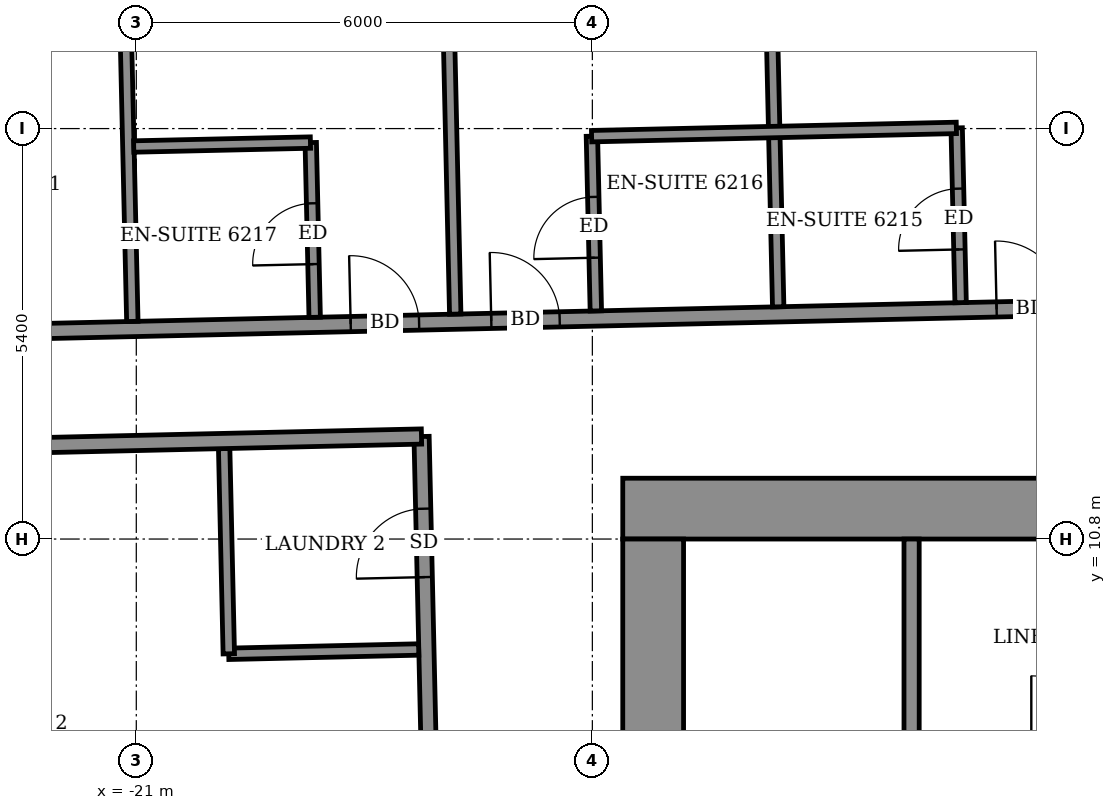
"""IFC4 building model, lengths in metres.
Left out: names, types, materials, properties, quantities, classifications, styles, units other than length and angle.
Written with IfcOpenShell. Run it as: python <this file> out.ifc"""

import sys

from ifc_helpers import new_model, si_unit, direction, frame, frame_2d, origin, place, context, subcontext, project, spatial, rectangle, extrude, element, fill, save


model = new_model("IFC4")
c1 = context("Model", 3, precision=1e-05, world=origin(), true_north=direction((0.0, 1.0)))
c2 = subcontext(c1, "Body", "Model", "MODEL_VIEW")
j1 = project(units=[si_unit("LENGTHUNIT", "METRE"), si_unit("PLANEANGLEUNIT", "RADIAN")], contexts=[c1])
p1 = place(None, origin())
s1 = spatial("IfcSite", under=j1, at=p1, CompositionType="ELEMENT")
p2 = place(p1, origin())
s2 = spatial("IfcBuilding", under=s1, at=p2, CompositionType="ELEMENT")
p3 = place(p2, frame((0.0, 0.0, 245.5)))
s3 = spatial("IfcBuildingStorey", under=s2, at=p3, CompositionType="ELEMENT", Elevation=245.5)
p4 = place(p3, frame((-16.678, -12.919, 0.0), z_axis=(0.0, 0.0, 1.0), x_axis=(-0.022696191528, 0.999742408268, 0.0)))
e1 = element("IfcWall", 1, at=p4, inside=s3, PredefinedType="PARTITIONING", context=c2, shape_type="SweptSolid", body=[
    extrude(rectangle(XDim=25.074, YDim=0.2, at=frame_2d((12.537, 0.0))), origin(), (0.0, 0.0, 1.0), 3.05),
])
p5 = place(p4, frame((19.537, 0.0, 0.0)))
e2 = element("IfcOpeningElement", 2, at=p5, cuts=e1, PredefinedType="OPENING", context=c2, shape_type="SweptSolid", body=[
    extrude(rectangle(XDim=1.0, YDim=2.1, at=frame_2d((0.5, 1.05))), frame((0.0, 0.11, 0.0), z_axis=(0.0, -1.0, 0.0), x_axis=(1.0, 0.0, 0.0)), (0.0, 0.0, 1.0), 0.22),
])
p6 = place(p4, frame((23.224, 0.0, 0.0)))
e3 = element("IfcOpeningElement", 3, at=p6, cuts=e1, PredefinedType="OPENING", context=c2, shape_type="SweptSolid", body=[
    extrude(rectangle(XDim=0.9, YDim=2.1, at=frame_2d((0.45, 1.05))), frame((0.0, 0.11, 0.0), z_axis=(0.0, -1.0, 0.0), x_axis=(1.0, 0.0, 0.0)), (0.0, 0.0, 1.0), 0.22),
])
p7 = place(p4, frame((13.849, 0.0, 0.0)))
e4 = element("IfcOpeningElement", 4, at=p7, cuts=e1, PredefinedType="OPENING", context=c2, shape_type="SweptSolid", body=[
    extrude(rectangle(XDim=1.0, YDim=2.1, at=frame_2d((0.5, 1.05))), frame((0.0, 0.11, 0.0), z_axis=(0.0, -1.0, 0.0), x_axis=(1.0, 0.0, 0.0)), (0.0, 0.0, 1.0), 0.22),
])
p8 = place(p4, frame((16.149, 0.0, 0.0)))
e5 = element("IfcOpeningElement", 5, at=p8, cuts=e1, PredefinedType="OPENING", context=c2, shape_type="SweptSolid", body=[
    extrude(rectangle(XDim=0.9, YDim=2.1, at=frame_2d((0.45, 1.05))), frame((0.0, 0.11, 0.0), z_axis=(0.0, -1.0, 0.0), x_axis=(1.0, 0.0, 0.0)), (0.0, 0.0, 1.0), 0.22),
])
p9 = place(p4, frame((11.849, 0.0, 0.0)))
e6 = element("IfcOpeningElement", 6, at=p9, cuts=e1, PredefinedType="OPENING", context=c2, shape_type="SweptSolid", body=[
    extrude(rectangle(XDim=1.0, YDim=2.1, at=frame_2d((0.5, 1.05))), frame((0.0, 0.11, 0.0), z_axis=(0.0, -1.0, 0.0), x_axis=(1.0, 0.0, 0.0)), (0.0, 0.0, 1.0), 0.22),
])
p10 = place(p4, frame((9.649, 0.0, 0.0)))
e7 = element("IfcOpeningElement", 7, at=p10, cuts=e1, PredefinedType="OPENING", context=c2, shape_type="SweptSolid", body=[
    extrude(rectangle(XDim=0.9, YDim=2.1, at=frame_2d((0.45, 1.05))), frame((0.0, 0.11, 0.0), z_axis=(0.0, -1.0, 0.0), x_axis=(1.0, 0.0, 0.0)), (0.0, 0.0, 1.0), 0.22),
])
p11 = place(p4, frame((7.324, 0.0, 0.0)))
e8 = element("IfcOpeningElement", 8, at=p11, cuts=e1, PredefinedType="OPENING", context=c2, shape_type="SweptSolid", body=[
    extrude(rectangle(XDim=1.0, YDim=2.1, at=frame_2d((0.5, 1.05))), frame((0.0, 0.11, 0.0), z_axis=(0.0, -1.0, 0.0), x_axis=(1.0, 0.0, 0.0)), (0.0, 0.0, 1.0), 0.22),
])
p12 = place(p4, frame((4.999, 0.0, 0.0)))
e9 = element("IfcOpeningElement", 9, at=p12, cuts=e1, PredefinedType="OPENING", context=c2, shape_type="SweptSolid", body=[
    extrude(rectangle(XDim=0.9, YDim=2.1, at=frame_2d((0.45, 1.05))), frame((0.0, 0.11, 0.0), z_axis=(0.0, -1.0, 0.0), x_axis=(1.0, 0.0, 0.0)), (0.0, 0.0, 1.0), 0.22),
])
p13 = place(p3, frame((-19.784, 9.29, 0.0), z_axis=(0.0, 0.0, 1.0), x_axis=(0.999741028149, 0.022756903044, 0.0)))
e10 = element("IfcWall", 10, at=p13, inside=s3, PredefinedType="PARTITIONING", context=c2, shape_type="SweptSolid", body=[
    extrude(rectangle(XDim=2.5, YDim=0.15, at=frame_2d((1.25, 0.0))), origin(), (0.0, 0.0, 1.0), 3.05),
])
p14 = place(p3, frame((-19.783, 9.29, 0.0), z_axis=(0.0, 0.0, 1.0), x_axis=(-0.022600248254, 0.99974458177, 0.0)))
e11 = element("IfcWall", 11, at=p14, inside=s3, PredefinedType="PARTITIONING", context=c2, shape_type="SweptSolid", body=[
    extrude(rectangle(XDim=2.701, YDim=0.15, at=frame_2d((1.35, 0.0))), origin(), (0.0, 0.0, 1.0), 3.05),
])
p15 = place(p3, frame((-27.618, 11.913, 0.0), z_axis=(0.0, 0.0, 1.0), x_axis=(0.999741483035, 0.022736910479, 0.0)))
e12 = element("IfcWall", 12, at=p15, inside=s3, PredefinedType="PARTITIONING", context=c2, shape_type="SweptSolid", body=[
    extrude(rectangle(XDim=10.373, YDim=0.2, at=frame_2d((5.186, 0.0))), origin(), (0.0, 0.0, 1.0), 3.05),
])
p16 = place(p3, frame((-27.652, 13.413, 0.0), z_axis=(0.0, 0.0, 1.0), x_axis=(0.999742864992, 0.022676064408, 0.0)))
e13 = element("IfcWall", 13, at=p16, inside=s3, PredefinedType="PARTITIONING", context=c2, shape_type="SweptSolid", body=[
    extrude(rectangle(XDim=50.882, YDim=0.2, at=frame_2d((25.441, 0.0))), origin(), (0.0, 0.0, 1.0), 3.05),
])
p17 = place(p16, frame((47.801, 0.0, 0.0)))
e14 = element("IfcOpeningElement", 14, at=p17, cuts=e13, PredefinedType="OPENING", context=c2, shape_type="SweptSolid", body=[
    extrude(rectangle(XDim=1.0, YDim=2.1, at=frame_2d((0.5, 1.05))), frame((0.0, 0.11, 0.0), z_axis=(0.0, -1.0, 0.0), x_axis=(1.0, 0.0, 0.0)), (0.0, 0.0, 1.0), 0.22),
])
p18 = place(p16, frame((43.425, 0.0, 0.0)))
e15 = element("IfcOpeningElement", 15, at=p18, cuts=e13, PredefinedType="OPENING", context=c2, shape_type="SweptSolid", body=[
    extrude(rectangle(XDim=0.9, YDim=2.1, at=frame_2d((0.45, 1.05))), frame((0.0, 0.11, 0.0), z_axis=(0.0, -1.0, 0.0), x_axis=(1.0, 0.0, 0.0)), (0.0, 0.0, 1.0), 0.22),
])
p19 = place(p16, frame((36.8, 0.0, 0.0)))
e16 = element("IfcOpeningElement", 16, at=p19, cuts=e13, PredefinedType="OPENING", context=c2, shape_type="SweptSolid", body=[
    extrude(rectangle(XDim=0.9, YDim=2.1, at=frame_2d((0.45, 1.05))), frame((0.0, 0.11, 0.0), z_axis=(0.0, -1.0, 0.0), x_axis=(1.0, 0.0, 0.0)), (0.0, 0.0, 1.0), 0.22),
])
p20 = place(p16, frame((34.975, 0.0, 0.0)))
e17 = element("IfcOpeningElement", 17, at=p20, cuts=e13, PredefinedType="OPENING", context=c2, shape_type="SweptSolid", body=[
    extrude(rectangle(XDim=0.9, YDim=2.1, at=frame_2d((0.45, 1.05))), frame((0.0, 0.11, 0.0), z_axis=(0.0, -1.0, 0.0), x_axis=(1.0, 0.0, 0.0)), (0.0, 0.0, 1.0), 0.22),
])
p21 = place(p16, frame((28.325, 0.0, 0.0)))
e18 = element("IfcOpeningElement", 18, at=p21, cuts=e13, PredefinedType="OPENING", context=c2, shape_type="SweptSolid", body=[
    extrude(rectangle(XDim=0.9, YDim=2.1, at=frame_2d((0.45, 1.05))), frame((0.0, 0.11, 0.0), z_axis=(0.0, -1.0, 0.0), x_axis=(1.0, 0.0, 0.0)), (0.0, 0.0, 1.0), 0.22),
])
p22 = place(p16, frame((26.475, 0.0, 0.0)))
e19 = element("IfcOpeningElement", 19, at=p22, cuts=e13, PredefinedType="OPENING", context=c2, shape_type="SweptSolid", body=[
    extrude(rectangle(XDim=0.9, YDim=2.1, at=frame_2d((0.45, 1.05))), frame((0.0, 0.11, 0.0), z_axis=(0.0, -1.0, 0.0), x_axis=(1.0, 0.0, 0.0)), (0.0, 0.0, 1.0), 0.22),
])
p23 = place(p16, frame((19.825, 0.0, 0.0)))
e20 = element("IfcOpeningElement", 20, at=p23, cuts=e13, PredefinedType="OPENING", context=c2, shape_type="SweptSolid", body=[
    extrude(rectangle(XDim=0.9, YDim=2.1, at=frame_2d((0.45, 1.05))), frame((0.0, 0.11, 0.0), z_axis=(0.0, -1.0, 0.0), x_axis=(1.0, 0.0, 0.0)), (0.0, 0.0, 1.0), 0.22),
])
p24 = place(p16, frame((17.975, 0.0, 0.0)))
e21 = element("IfcOpeningElement", 21, at=p24, cuts=e13, PredefinedType="OPENING", context=c2, shape_type="SweptSolid", body=[
    extrude(rectangle(XDim=0.9, YDim=2.1, at=frame_2d((0.45, 1.05))), frame((0.0, 0.11, 0.0), z_axis=(0.0, -1.0, 0.0), x_axis=(1.0, 0.0, 0.0)), (0.0, 0.0, 1.0), 0.22),
])
p25 = place(p16, frame((11.325, 0.0, 0.0)))
e22 = element("IfcOpeningElement", 22, at=p25, cuts=e13, PredefinedType="OPENING", context=c2, shape_type="SweptSolid", body=[
    extrude(rectangle(XDim=0.9, YDim=2.1, at=frame_2d((0.45, 1.05))), frame((0.0, 0.11, 0.0), z_axis=(0.0, -1.0, 0.0), x_axis=(1.0, 0.0, 0.0)), (0.0, 0.0, 1.0), 0.22),
])
p26 = place(p16, frame((9.475, 0.0, 0.0)))
e23 = element("IfcOpeningElement", 23, at=p26, cuts=e13, PredefinedType="OPENING", context=c2, shape_type="SweptSolid", body=[
    extrude(rectangle(XDim=0.9, YDim=2.1, at=frame_2d((0.45, 1.05))), frame((0.0, 0.11, 0.0), z_axis=(0.0, -1.0, 0.0), x_axis=(1.0, 0.0, 0.0)), (0.0, 0.0, 1.0), 0.22),
])
p27 = place(p16, frame((2.772, 0.0, 0.0)))
e24 = element("IfcOpeningElement", 24, at=p27, cuts=e13, PredefinedType="OPENING", context=c2, shape_type="SweptSolid", body=[
    extrude(rectangle(XDim=1.0, YDim=2.1, at=frame_2d((0.5, 1.05))), frame((0.0, 0.11, 0.0), z_axis=(0.0, -1.0, 0.0), x_axis=(1.0, 0.0, 0.0)), (0.0, 0.0, 1.0), 0.22),
])
p28 = place(p3, frame((-21.052, 13.663, 0.0), z_axis=(0.0, 0.0, 1.0), x_axis=(-0.022706435224, 0.999742175663, 0.0)))
e25 = element("IfcWall", 25, at=p28, inside=s3, PredefinedType="PARTITIONING", context=c2, shape_type="SweptSolid", body=[
    extrude(rectangle(XDim=8.15, YDim=0.15, at=frame_2d((4.075, 0.0))), origin(), (0.0, 0.0, 1.0), 2.5),
])
p29 = place(p3, frame((-18.653, 13.717, 0.0), z_axis=(0.0, 0.0, 1.0), x_axis=(-0.022612884682, 0.999744296031, 0.0)))
e26 = element("IfcWall", 26, at=p29, inside=s3, PredefinedType="PARTITIONING", context=c2, shape_type="SweptSolid", body=[
    extrude(rectangle(XDim=2.3, YDim=0.15, at=frame_2d((1.15, 0.0))), origin(), (0.0, 0.0, 1.0), 3.05),
])
p30 = place(p29, frame((0.7, 0.0, 0.0)))
e27 = element("IfcOpeningElement", 27, at=p30, cuts=e26, PredefinedType="OPENING", context=c2, shape_type="SweptSolid", body=[
    extrude(rectangle(XDim=0.8, YDim=2.1, at=frame_2d((0.4, 1.05))), frame((0.0, 0.085, 0.0), z_axis=(0.0, -1.0, 0.0), x_axis=(1.0, 0.0, 0.0)), (0.0, 0.0, 1.0), 0.17),
])
p31 = place(p3, frame((-16.804, 13.759, 0.0), z_axis=(0.0, 0.0, 1.0), x_axis=(-0.022586673637, 0.999744888546, 0.0)))
e28 = element("IfcWall", 28, at=p31, inside=s3, PredefinedType="PARTITIONING", context=c2, shape_type="SweptSolid", body=[
    extrude(rectangle(XDim=8.15, YDim=0.15, at=frame_2d((4.075, 0.0))), origin(), (0.0, 0.0, 1.0), 3.05),
])
p32 = place(p3, frame((-14.954, 13.801, 0.0), z_axis=(0.0, 0.0, 1.0), x_axis=(-0.022612884682, 0.999744296031, 0.0)))
e29 = element("IfcWall", 29, at=p32, inside=s3, PredefinedType="PARTITIONING", context=c2, shape_type="SweptSolid", body=[
    extrude(rectangle(XDim=2.3, YDim=0.15, at=frame_2d((1.15, 0.0))), origin(), (0.0, 0.0, 1.0), 3.05),
])
p33 = place(p32, frame((0.7, 0.0, 0.0)))
e30 = element("IfcOpeningElement", 30, at=p33, cuts=e29, PredefinedType="OPENING", context=c2, shape_type="SweptSolid", body=[
    extrude(rectangle(XDim=0.8, YDim=2.1, at=frame_2d((0.4, 1.05))), frame((0.0, 0.085, 0.0), z_axis=(0.0, -1.0, 0.0), x_axis=(1.0, 0.0, 0.0)), (0.0, 0.0, 1.0), 0.17),
])
p34 = place(p3, frame((-12.555, 13.855, 0.0), z_axis=(0.0, 0.0, 1.0), x_axis=(-0.022706435224, 0.999742175663, 0.0)))
e31 = element("IfcWall", 31, at=p34, inside=s3, PredefinedType="PARTITIONING", context=c2, shape_type="SweptSolid", body=[
    extrude(rectangle(XDim=8.15, YDim=0.15, at=frame_2d((4.075, 0.0))), origin(), (0.0, 0.0, 1.0), 2.5),
])
p35 = place(p3, frame((-10.155, 13.91, 0.0), z_axis=(0.0, 0.0, 1.0), x_axis=(-0.022612884682, 0.999744296031, 0.0)))
e32 = element("IfcWall", 32, at=p35, inside=s3, PredefinedType="PARTITIONING", context=c2, shape_type="SweptSolid", body=[
    extrude(rectangle(XDim=2.3, YDim=0.15, at=frame_2d((1.15, 0.0))), origin(), (0.0, 0.0, 1.0), 3.05),
])
p36 = place(p35, frame((0.7, 0.0, 0.0)))
e33 = element("IfcOpeningElement", 33, at=p36, cuts=e32, PredefinedType="OPENING", context=c2, shape_type="SweptSolid", body=[
    extrude(rectangle(XDim=0.8, YDim=2.1, at=frame_2d((0.4, 1.05))), frame((0.0, 0.085, 0.0), z_axis=(0.0, -1.0, 0.0), x_axis=(1.0, 0.0, 0.0)), (0.0, 0.0, 1.0), 0.17),
])
p37 = place(p3, frame((-21.034, 15.964, 0.0), z_axis=(0.0, 0.0, 1.0), x_axis=(0.999749954681, 0.022361308448, 0.0)))
e34 = element("IfcWall", 34, at=p37, inside=s3, PredefinedType="PARTITIONING", context=c2, shape_type="SweptSolid", body=[
    extrude(rectangle(XDim=2.325, YDim=0.15, at=frame_2d((1.163, 0.0))), origin(), (0.0, 0.0, 1.0), 3.05),
])
p38 = place(p3, frame((-15.01, 16.1, 0.0), z_axis=(0.0, 0.0, 1.0), x_axis=(0.999742701292, 0.022683280499, 0.0)))
e35 = element("IfcWall", 35, at=p38, inside=s3, PredefinedType="PARTITIONING", context=c2, shape_type="SweptSolid", body=[
    extrude(rectangle(XDim=4.8, YDim=0.15, at=frame_2d((2.4, 0.0))), origin(), (0.0, 0.0, 1.0), 3.05),
])
p39 = place(p3, frame((-14.6, 11.2, 0.0), z_axis=(0.0, 0.0, 1.0), x_axis=(1.0, 0.0, 0.0)))
e36 = element("IfcWall", 36, at=p39, inside=s3, PredefinedType="SHEAR", context=c2, shape_type="SweptSolid", body=[
    extrude(rectangle(XDim=29.2, YDim=0.8, at=frame_2d((14.6, 0.0))), origin(), (0.0, 0.0, 1.0), 3.6),
])
p40 = place(p3, frame((-14.2, -10.8, 0.0), z_axis=(0.0, 0.0, 1.0), x_axis=(0.0, 1.0, 0.0)))
e37 = element("IfcWall", 37, at=p40, inside=s3, PredefinedType="SHEAR", context=c2, shape_type="SweptSolid", body=[
    extrude(rectangle(XDim=21.6, YDim=0.8, at=frame_2d((10.8, 0.0))), origin(), (0.0, 0.0, 1.0), 3.6),
])
p41 = place(p40, frame((8.25, 0.0, 0.0)))
e38 = element("IfcOpeningElement", 38, at=p41, cuts=e37, PredefinedType="OPENING", context=c2, shape_type="SweptSolid", body=[
    extrude(rectangle(XDim=1.2, YDim=2.1, at=frame_2d((0.6, 1.05))), frame((0.0, 0.41, 0.0), z_axis=(0.0, -1.0, 0.0), x_axis=(1.0, 0.0, 0.0)), (0.0, 0.0, 1.0), 0.82),
])
p42 = place(p40, frame((15.25, 0.0, 0.0)))
e39 = element("IfcOpeningElement", 39, at=p42, cuts=e37, PredefinedType="OPENING", context=c2, shape_type="SweptSolid", body=[
    extrude(rectangle(XDim=1.2, YDim=2.1, at=frame_2d((0.6, 1.05))), frame((0.0, 0.41, 0.0), z_axis=(0.0, -1.0, 0.0), x_axis=(1.0, 0.0, 0.0)), (0.0, 0.0, 1.0), 0.82),
])
p43 = place(p3, frame((-10.8, 8.2, 0.0), z_axis=(0.0, 0.0, 1.0), x_axis=(0.0, 1.0, 0.0)))
e40 = element("IfcWall", 40, at=p43, inside=s3, PredefinedType="STANDARD", context=c2, shape_type="SweptSolid", body=[
    extrude(rectangle(XDim=2.6, YDim=0.2, at=frame_2d((1.3, 0.0))), origin(), (0.0, 0.0, 1.0), 3.05),
])
p44 = place(p24, origin())
e41 = element("IfcDoor", 41, at=p44, inside=s3, OperationType="SINGLE_SWING_LEFT", PredefinedType="DOOR", context=c2, shape_type="SweptSolid", body=[
    extrude(rectangle(XDim=0.9, YDim=2.1, at=frame_2d((0.45, 1.05))), frame((0.0, 0.025, 0.0), z_axis=(0.0, -1.0, 0.0), x_axis=(1.0, 0.0, 0.0)), (0.0, 0.0, 1.0), 0.05),
])
fill(e21, e41)
p45 = place(p36, origin())
e42 = element("IfcDoor", 42, at=p45, inside=s3, OperationType="SINGLE_SWING_LEFT", PredefinedType="DOOR", context=c2, shape_type="SweptSolid", body=[
    extrude(rectangle(XDim=0.8, YDim=2.1, at=frame_2d((0.4, 1.05))), frame((0.0, 0.025, 0.0), z_axis=(0.0, -1.0, 0.0), x_axis=(1.0, 0.0, 0.0)), (0.0, 0.0, 1.0), 0.05),
])
fill(e33, e42)
p46 = place(p25, origin())
e43 = element("IfcDoor", 43, at=p46, inside=s3, OperationType="SINGLE_SWING_RIGHT", PredefinedType="DOOR", context=c2, shape_type="SweptSolid", body=[
    extrude(rectangle(XDim=0.9, YDim=2.1, at=frame_2d((0.45, 1.05))), frame((0.0, 0.025, 0.0), z_axis=(0.0, -1.0, 0.0), x_axis=(1.0, 0.0, 0.0)), (0.0, 0.0, 1.0), 0.05),
])
fill(e22, e43)
p47 = place(p33, origin())
e44 = element("IfcDoor", 44, at=p47, inside=s3, OperationType="SINGLE_SWING_RIGHT", PredefinedType="DOOR", context=c2, shape_type="SweptSolid", body=[
    extrude(rectangle(XDim=0.8, YDim=2.1, at=frame_2d((0.4, 1.05))), frame((0.0, 0.025, 0.0), z_axis=(0.0, -1.0, 0.0), x_axis=(1.0, 0.0, 0.0)), (0.0, 0.0, 1.0), 0.05),
])
fill(e30, e44)
p48 = place(p26, origin())
e45 = element("IfcDoor", 45, at=p48, inside=s3, OperationType="SINGLE_SWING_LEFT", PredefinedType="DOOR", context=c2, shape_type="SweptSolid", body=[
    extrude(rectangle(XDim=0.9, YDim=2.1, at=frame_2d((0.45, 1.05))), frame((0.0, 0.025, 0.0), z_axis=(0.0, -1.0, 0.0), x_axis=(1.0, 0.0, 0.0)), (0.0, 0.0, 1.0), 0.05),
])
fill(e23, e45)
p49 = place(p30, origin())
e46 = element("IfcDoor", 46, at=p49, inside=s3, OperationType="SINGLE_SWING_LEFT", PredefinedType="DOOR", context=c2, shape_type="SweptSolid", body=[
    extrude(rectangle(XDim=0.8, YDim=2.1, at=frame_2d((0.4, 1.05))), frame((0.0, 0.025, 0.0), z_axis=(0.0, -1.0, 0.0), x_axis=(1.0, 0.0, 0.0)), (0.0, 0.0, 1.0), 0.05),
])
fill(e27, e46)
p50 = place(p6, origin())
e47 = element("IfcDoor", 47, at=p50, inside=s3, OperationType="SINGLE_SWING_LEFT", PredefinedType="DOOR", context=c2, shape_type="SweptSolid", body=[
    extrude(rectangle(XDim=0.9, YDim=2.1, at=frame_2d((0.45, 1.05))), frame((0.0, 0.025, 0.0), z_axis=(0.0, -1.0, 0.0), x_axis=(1.0, 0.0, 0.0)), (0.0, 0.0, 1.0), 0.05),
])
fill(e3, e47)
save(model, sys.argv[1])
